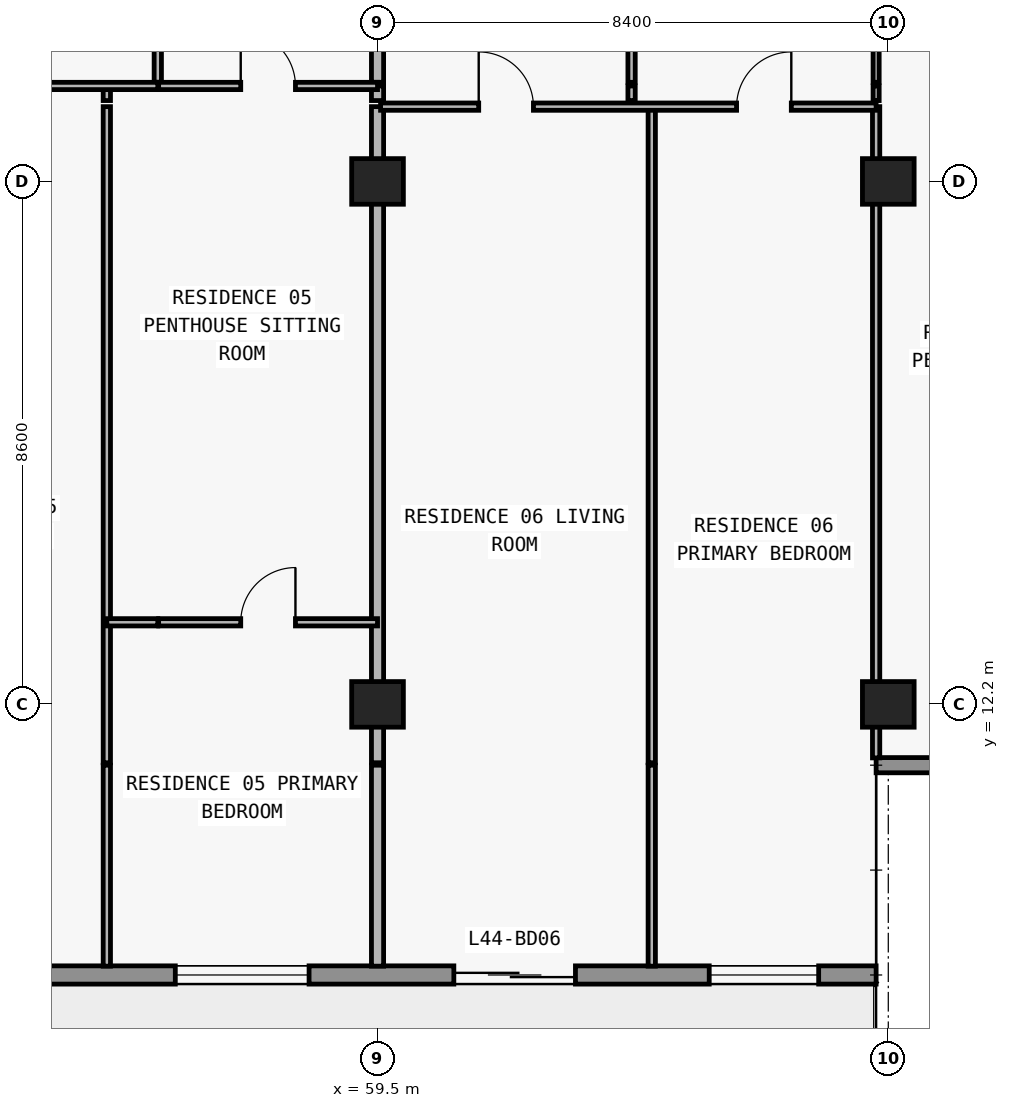
"""IFC4 building model, lengths in metres.
Left out: names, types, materials, properties, quantities, classifications, styles, units other than length and angle.
Written with IfcOpenShell. Run it as: python <this file> out.ifc"""

import sys

from ifc_helpers import new_model, si_unit, direction, frame, frame_2d, origin, origin_2d, place, context, subcontext, project, spatial, rectangle, extrude, element, fill, save


model = new_model("IFC4")
c1 = context("Model", 3, precision=1e-05, world=origin(), true_north=direction((0.0, 1.0)))
c2 = subcontext(c1, "Body", "Model", "MODEL_VIEW")
j1 = project(units=[si_unit("LENGTHUNIT", "METRE"), si_unit("PLANEANGLEUNIT", "RADIAN")], contexts=[c1])
p1 = place(None, origin())
s1 = spatial("IfcSite", under=j1, at=p1, CompositionType="ELEMENT")
p2 = place(p1, origin())
s2 = spatial("IfcBuilding", under=s1, at=p2, CompositionType="ELEMENT")
p3 = place(p2, frame((0.0, 0.0, 160.5)))
s3 = spatial("IfcBuildingStorey", under=s2, at=p3, CompositionType="ELEMENT", Elevation=160.5)
for number, where, z_axis, x_axis in (
    (1, (59.5, 12.2, 0.0), (0.0, 0.0, 1.0), (1.0, 0.0, 0.0)),
    (2, (67.9, 12.2, 0.0), (0.0, 0.0, 1.0), (1.0, 0.0, 0.0)),
    (3, (59.5, 20.8, 0.0), (0.0, 0.0, 1.0), (1.0, 0.0, 0.0)),
    (4, (67.9, 20.8, 0.0), (0.0, 0.0, 1.0), (1.0, 0.0, 0.0)),
):
    element("IfcColumn", number, at=place(p3, frame(where, z_axis=z_axis, x_axis=x_axis)), inside=s3, PredefinedType="COLUMN", context=c2, shape_type="SweptSolid", body=[
        extrude(rectangle(XDim=0.85, YDim=0.75, at=origin_2d()), origin(), (0.0, 0.0, 1.0), 3.05),
    ])
p4 = place(p3, frame((67.7, 7.75, 0.0), z_axis=(0.0, 0.0, 1.0), x_axis=(-1.0, 0.0, 0.0)))
e5 = element("IfcWall", 5, at=p4, inside=s3, PredefinedType="STANDARD", context=c2, shape_type="SweptSolid", body=[
    extrude(rectangle(XDim=57.6, YDim=0.3, at=frame_2d((28.8, 0.0))), origin(), (0.0, 0.0, 1.0), 3.05),
])
p5 = place(p4, frame((54.673, 0.0, 0.0)))
e6 = element("IfcOpeningElement", 6, at=p5, cuts=e5, PredefinedType="OPENING", context=c2, shape_type="SweptSolid", body=[
    extrude(rectangle(XDim=2.0, YDim=2.3, at=frame_2d((1.0, 1.15))), frame((0.0, 0.16, 0.0), z_axis=(0.0, -1.0, 0.0), x_axis=(1.0, 0.0, 0.0)), (0.0, 0.0, 1.0), 0.32),
])
p6 = place(p4, frame((50.473, 0.0, 0.85)))
e7 = element("IfcOpeningElement", 7, at=p6, cuts=e5, PredefinedType="OPENING", context=c2, shape_type="SweptSolid", body=[
    extrude(rectangle(XDim=2.2, YDim=1.55, at=frame_2d((1.1, 0.775))), frame((0.0, 0.16, 0.0), z_axis=(0.0, -1.0, 0.0), x_axis=(1.0, 0.0, 0.0)), (0.0, 0.0, 1.0), 0.32),
])
p7 = place(p4, frame((46.09, 0.0, 0.0)))
e8 = element("IfcOpeningElement", 8, at=p7, cuts=e5, PredefinedType="OPENING", context=c2, shape_type="SweptSolid", body=[
    extrude(rectangle(XDim=2.0, YDim=2.3, at=frame_2d((1.0, 1.15))), frame((0.0, 0.16, 0.0), z_axis=(0.0, -1.0, 0.0), x_axis=(1.0, 0.0, 0.0)), (0.0, 0.0, 1.0), 0.32),
])
p8 = place(p4, frame((41.99, 0.0, 0.85)))
e9 = element("IfcOpeningElement", 9, at=p8, cuts=e5, PredefinedType="OPENING", context=c2, shape_type="SweptSolid", body=[
    extrude(rectangle(XDim=1.8, YDim=1.55, at=frame_2d((0.9, 0.775))), frame((0.0, 0.16, 0.0), z_axis=(0.0, -1.0, 0.0), x_axis=(1.0, 0.0, 0.0)), (0.0, 0.0, 1.0), 0.32),
])
p9 = place(p4, frame((38.09, 0.0, 0.0)))
e10 = element("IfcOpeningElement", 10, at=p9, cuts=e5, PredefinedType="OPENING", context=c2, shape_type="SweptSolid", body=[
    extrude(rectangle(XDim=2.0, YDim=2.3, at=frame_2d((1.0, 1.15))), frame((0.0, 0.16, 0.0), z_axis=(0.0, -1.0, 0.0), x_axis=(1.0, 0.0, 0.0)), (0.0, 0.0, 1.0), 0.32),
])
p10 = place(p4, frame((33.41, 0.0, 0.65)))
e11 = element("IfcOpeningElement", 11, at=p10, cuts=e5, PredefinedType="OPENING", context=c2, shape_type="SweptSolid", body=[
    extrude(rectangle(XDim=2.6, YDim=1.85, at=frame_2d((1.3, 0.925))), frame((0.0, 0.16, 0.0), z_axis=(0.0, -1.0, 0.0), x_axis=(1.0, 0.0, 0.0)), (0.0, 0.0, 1.0), 0.32),
])
p11 = place(p4, frame((27.7, 0.0, 0.85)))
e12 = element("IfcOpeningElement", 12, at=p11, cuts=e5, PredefinedType="OPENING", context=c2, shape_type="SweptSolid", body=[
    extrude(rectangle(XDim=2.2, YDim=1.55, at=frame_2d((1.1, 0.775))), frame((0.0, 0.16, 0.0), z_axis=(0.0, -1.0, 0.0), x_axis=(1.0, 0.0, 0.0)), (0.0, 0.0, 1.0), 0.32),
])
p12 = place(p4, frame((21.69, 0.0, 0.0)))
e13 = element("IfcOpeningElement", 13, at=p12, cuts=e5, PredefinedType="OPENING", context=c2, shape_type="SweptSolid", body=[
    extrude(rectangle(XDim=2.0, YDim=2.3, at=frame_2d((1.0, 1.15))), frame((0.0, 0.16, 0.0), z_axis=(0.0, -1.0, 0.0), x_axis=(1.0, 0.0, 0.0)), (0.0, 0.0, 1.0), 0.32),
])
p13 = place(p4, frame((17.59, 0.0, 0.85)))
e14 = element("IfcOpeningElement", 14, at=p13, cuts=e5, PredefinedType="OPENING", context=c2, shape_type="SweptSolid", body=[
    extrude(rectangle(XDim=1.8, YDim=1.55, at=frame_2d((0.9, 0.775))), frame((0.0, 0.16, 0.0), z_axis=(0.0, -1.0, 0.0), x_axis=(1.0, 0.0, 0.0)), (0.0, 0.0, 1.0), 0.32),
])
p14 = place(p4, frame((13.626, 0.0, 0.0)))
e15 = element("IfcOpeningElement", 15, at=p14, cuts=e5, PredefinedType="OPENING", context=c2, shape_type="SweptSolid", body=[
    extrude(rectangle(XDim=2.0, YDim=2.3, at=frame_2d((1.0, 1.15))), frame((0.0, 0.16, 0.0), z_axis=(0.0, -1.0, 0.0), x_axis=(1.0, 0.0, 0.0)), (0.0, 0.0, 1.0), 0.32),
])
p15 = place(p4, frame((9.326, 0.0, 0.85)))
e16 = element("IfcOpeningElement", 16, at=p15, cuts=e5, PredefinedType="OPENING", context=c2, shape_type="SweptSolid", body=[
    extrude(rectangle(XDim=2.2, YDim=1.55, at=frame_2d((1.1, 0.775))), frame((0.0, 0.16, 0.0), z_axis=(0.0, -1.0, 0.0), x_axis=(1.0, 0.0, 0.0)), (0.0, 0.0, 1.0), 0.32),
])
p16 = place(p4, frame((4.945, 0.0, 0.0)))
e17 = element("IfcOpeningElement", 17, at=p16, cuts=e5, PredefinedType="OPENING", context=c2, shape_type="SweptSolid", body=[
    extrude(rectangle(XDim=2.0, YDim=2.3, at=frame_2d((1.0, 1.15))), frame((0.0, 0.16, 0.0), z_axis=(0.0, -1.0, 0.0), x_axis=(1.0, 0.0, 0.0)), (0.0, 0.0, 1.0), 0.32),
])
p17 = place(p4, frame((0.945, 0.0, 0.85)))
e18 = element("IfcOpeningElement", 18, at=p17, cuts=e5, PredefinedType="OPENING", context=c2, shape_type="SweptSolid", body=[
    extrude(rectangle(XDim=1.8, YDim=1.55, at=frame_2d((0.9, 0.775))), frame((0.0, 0.16, 0.0), z_axis=(0.0, -1.0, 0.0), x_axis=(1.0, 0.0, 0.0)), (0.0, 0.0, 1.0), 0.32),
])
p18 = place(p3, frame((67.7, 11.2, 0.0), z_axis=(0.0, 0.0, 1.0), x_axis=(1.0, 0.0, 0.0)))
e19 = element("IfcWall", 19, at=p18, inside=s3, PredefinedType="ELEMENTEDWALL", context=c2, shape_type="SweptSolid", body=[
    extrude(rectangle(XDim=3.85, YDim=0.25, at=frame_2d((1.925, 0.0))), origin(), (0.0, 0.0, 1.0), 3.05),
])
p19 = place(p3, frame((55.048, 7.895, 0.0), z_axis=(0.0, 0.0, 1.0), x_axis=(0.0, 1.0, 0.0)))
e20 = element("IfcWall", 20, at=p19, inside=s3, PredefinedType="PARTITIONING", context=c2, shape_type="SweptSolid", body=[
    extrude(rectangle(XDim=3.305, YDim=0.12, at=frame_2d((1.652, 0.0))), origin(), (0.0, 0.0, 1.0), 3.05),
])
p20 = place(p3, frame((55.048, 11.24, 0.0), z_axis=(0.0, 0.0, 1.0), x_axis=(0.0, 1.0, 0.0)))
e21 = element("IfcWall", 21, at=p20, inside=s3, PredefinedType="PARTITIONING", context=c2, shape_type="SweptSolid", body=[
    extrude(rectangle(XDim=10.79, YDim=0.12, at=frame_2d((5.395, 0.0))), origin(), (0.0, 0.0, 1.0), 3.05),
])
p21 = place(p3, frame((55.048, 22.13, 0.0), z_axis=(0.0, 0.0, 1.0), x_axis=(0.0, 1.0, 0.0)))
e22 = element("IfcWall", 22, at=p21, inside=s3, PredefinedType="PARTITIONING", context=c2, shape_type="SweptSolid", body=[
    extrude(rectangle(XDim=0.24, YDim=0.12, at=frame_2d((0.12, 0.0))), origin(), (0.0, 0.0, 1.0), 3.05),
])
p22 = place(p3, frame((55.886, 22.43, 0.0), z_axis=(0.0, 0.0, 1.0), x_axis=(0.0, 1.0, 0.0)))
e23 = element("IfcWall", 23, at=p22, inside=s3, PredefinedType="PARTITIONING", context=c2, shape_type="SweptSolid", body=[
    extrude(rectangle(XDim=4.75, YDim=0.12, at=frame_2d((2.375, 0.0))), origin(), (0.0, 0.0, 1.0), 3.05),
])
p23 = place(p22, frame((1.925, 0.0, 0.0)))
e24 = element("IfcOpeningElement", 24, at=p23, cuts=e23, PredefinedType="OPENING", context=c2, shape_type="SweptSolid", body=[
    extrude(rectangle(XDim=0.9, YDim=2.15, at=frame_2d((0.45, 1.075))), frame((0.0, 0.07, 0.0), z_axis=(0.0, -1.0, 0.0), x_axis=(1.0, 0.0, 0.0)), (0.0, 0.0, 1.0), 0.14),
])
p24 = place(p3, frame((59.5, 7.895, 0.0), z_axis=(0.0, 0.0, 1.0), x_axis=(0.0, 1.0, 0.0)))
e25 = element("IfcWall", 25, at=p24, inside=s3, PredefinedType="PARTITIONING", context=c2, shape_type="SweptSolid", body=[
    extrude(rectangle(XDim=3.305, YDim=0.2, at=frame_2d((1.652, 0.0))), origin(), (0.0, 0.0, 1.0), 3.05),
])
p25 = place(p3, frame((59.5, 11.24, 0.0), z_axis=(0.0, 0.0, 1.0), x_axis=(0.0, 1.0, 0.0)))
e26 = element("IfcWall", 26, at=p25, inside=s3, PredefinedType="PARTITIONING", context=c2, shape_type="SweptSolid", body=[
    extrude(rectangle(XDim=10.79, YDim=0.2, at=frame_2d((5.395, 0.0))), origin(), (0.0, 0.0, 1.0), 2.263),
])
p26 = place(p3, frame((59.5, 22.13, 0.0), z_axis=(0.0, 0.0, 1.0), x_axis=(0.0, 1.0, 0.0)))
e27 = element("IfcWall", 27, at=p26, inside=s3, PredefinedType="PARTITIONING", context=c2, shape_type="SweptSolid", body=[
    extrude(rectangle(XDim=0.24, YDim=0.2, at=frame_2d((0.12, 0.0))), origin(), (0.0, 0.0, 1.0), 2.263),
])
p27 = place(p3, frame((59.5, 22.43, 0.0), z_axis=(0.0, 0.0, 1.0), x_axis=(0.0, 1.0, 0.0)))
e28 = element("IfcWall", 28, at=p27, inside=s3, PredefinedType="PARTITIONING", context=c2, shape_type="SweptSolid", body=[
    extrude(rectangle(XDim=4.75, YDim=0.2, at=frame_2d((2.375, 0.0))), origin(), (0.0, 0.0, 1.0), 2.263),
])
p28 = place(p3, frame((63.678, 22.13, 0.0), z_axis=(0.0, 0.0, 1.0), x_axis=(0.0, 1.0, 0.0)))
e29 = element("IfcWall", 29, at=p28, inside=s3, PredefinedType="PARTITIONING", context=c2, shape_type="SweptSolid", body=[
    extrude(rectangle(XDim=0.24, YDim=0.12, at=frame_2d((0.12, 0.0))), origin(), (0.0, 0.0, 1.0), 3.05),
])
p29 = place(p3, frame((63.678, 22.43, 0.0), z_axis=(0.0, 0.0, 1.0), x_axis=(0.0, 1.0, 0.0)))
e30 = element("IfcWall", 30, at=p29, inside=s3, PredefinedType="PARTITIONING", context=c2, shape_type="SweptSolid", body=[
    extrude(rectangle(XDim=4.75, YDim=0.12, at=frame_2d((2.375, 0.0))), origin(), (0.0, 0.0, 1.0), 3.05),
])
p30 = place(p29, frame((1.925, 0.0, 0.0)))
e31 = element("IfcOpeningElement", 31, at=p30, cuts=e30, PredefinedType="OPENING", context=c2, shape_type="SweptSolid", body=[
    extrude(rectangle(XDim=0.9, YDim=2.15, at=frame_2d((0.45, 1.075))), frame((0.0, 0.07, 0.0), z_axis=(0.0, -1.0, 0.0), x_axis=(1.0, 0.0, 0.0)), (0.0, 0.0, 1.0), 0.14),
])
p31 = place(p3, frame((64.01, 7.895, 0.0), z_axis=(0.0, 0.0, 1.0), x_axis=(0.0, 1.0, 0.0)))
e32 = element("IfcWall", 32, at=p31, inside=s3, PredefinedType="PARTITIONING", context=c2, shape_type="SweptSolid", body=[
    extrude(rectangle(XDim=3.305, YDim=0.12, at=frame_2d((1.652, 0.0))), origin(), (0.0, 0.0, 1.0), 3.05),
])
p32 = place(p3, frame((64.01, 11.24, 0.0), z_axis=(0.0, 0.0, 1.0), x_axis=(0.0, 1.0, 0.0)))
e33 = element("IfcWall", 33, at=p32, inside=s3, PredefinedType="PARTITIONING", context=c2, shape_type="SweptSolid", body=[
    extrude(rectangle(XDim=10.79, YDim=0.12, at=frame_2d((5.395, 0.0))), origin(), (0.0, 0.0, 1.0), 3.05),
])
p33 = place(p3, frame((67.7, 11.32, 0.0), z_axis=(0.0, 0.0, 1.0), x_axis=(0.0, 1.0, 0.0)))
e34 = element("IfcWall", 34, at=p33, inside=s3, PredefinedType="PARTITIONING", context=c2, shape_type="SweptSolid", body=[
    extrude(rectangle(XDim=10.71, YDim=0.12, at=frame_2d((5.355, 0.0))), origin(), (0.0, 0.0, 1.0), 2.263),
])
p34 = place(p3, frame((67.7, 22.13, 0.0), z_axis=(0.0, 0.0, 1.0), x_axis=(0.0, 1.0, 0.0)))
e35 = element("IfcWall", 35, at=p34, inside=s3, PredefinedType="MOVABLE", context=c2, shape_type="SweptSolid", body=[
    extrude(rectangle(XDim=0.24, YDim=0.1, at=frame_2d((0.12, 0.0))), origin(), (0.0, 0.0, 1.0), 2.263),
])
p35 = place(p3, frame((67.7, 22.43, 0.0), z_axis=(0.0, 0.0, 1.0), x_axis=(0.0, 1.0, 0.0)))
e36 = element("IfcWall", 36, at=p35, inside=s3, PredefinedType="MOVABLE", context=c2, shape_type="SweptSolid", body=[
    extrude(rectangle(XDim=4.75, YDim=0.1, at=frame_2d((2.375, 0.0))), origin(), (0.0, 0.0, 1.0), 2.263),
])
p36 = place(p35, frame((1.925, 0.0, 0.0)))
e37 = element("IfcOpeningElement", 37, at=p36, cuts=e36, PredefinedType="OPENING", context=c2, shape_type="SweptSolid", body=[
    extrude(rectangle(XDim=0.9, YDim=2.15, at=frame_2d((0.45, 1.075))), frame((0.0, 0.06, 0.0), z_axis=(0.0, -1.0, 0.0), x_axis=(1.0, 0.0, 0.0)), (0.0, 0.0, 1.0), 0.12),
])
p37 = place(p3, frame((55.048, 13.55, 0.0), z_axis=(0.0, 0.0, 1.0), x_axis=(1.0, 0.0, 0.0)))
e38 = element("IfcWall", 38, at=p37, inside=s3, PredefinedType="PARTITIONING", context=c2, shape_type="SweptSolid", body=[
    extrude(rectangle(XDim=0.838, YDim=0.12, at=frame_2d((0.419, 0.0))), origin(), (0.0, 0.0, 1.0), 3.05),
])
p38 = place(p3, frame((55.9, 13.55, 0.0), z_axis=(0.0, 0.0, 1.0), x_axis=(1.0, 0.0, 0.0)))
e39 = element("IfcWall", 39, at=p38, inside=s3, PredefinedType="PARTITIONING", context=c2, shape_type="SweptSolid", body=[
    extrude(rectangle(XDim=3.6, YDim=0.12, at=frame_2d((1.8, 0.0))), origin(), (0.0, 0.0, 1.0), 3.05),
])
p39 = place(p38, frame((1.35, 0.0, 0.0)))
e40 = element("IfcOpeningElement", 40, at=p39, cuts=e39, PredefinedType="OPENING", context=c2, shape_type="SweptSolid", body=[
    extrude(rectangle(XDim=0.9, YDim=2.15, at=frame_2d((0.45, 1.075))), frame((0.0, 0.07, 0.0), z_axis=(0.0, -1.0, 0.0), x_axis=(1.0, 0.0, 0.0)), (0.0, 0.0, 1.0), 0.14),
])
p40 = place(p3, frame((59.55, 22.03, 0.0), z_axis=(0.0, 0.0, 1.0), x_axis=(1.0, 0.0, 0.0)))
e41 = element("IfcWall", 41, at=p40, inside=s3, PredefinedType="PARTITIONING", context=c2, shape_type="SweptSolid", body=[
    extrude(rectangle(XDim=8.15, YDim=0.12, at=frame_2d((4.075, 0.0))), origin(), (0.0, 0.0, 1.0), 3.05),
])
p41 = place(p40, frame((1.614, 0.0, 0.0)))
e42 = element("IfcOpeningElement", 42, at=p41, cuts=e41, PredefinedType="OPENING", context=c2, shape_type="SweptSolid", body=[
    extrude(rectangle(XDim=0.9, YDim=2.15, at=frame_2d((0.45, 1.075))), frame((0.0, 0.07, 0.0), z_axis=(0.0, -1.0, 0.0), x_axis=(1.0, 0.0, 0.0)), (0.0, 0.0, 1.0), 0.14),
])
p42 = place(p40, frame((5.855, 0.0, 0.0)))
e43 = element("IfcOpeningElement", 43, at=p42, cuts=e41, PredefinedType="OPENING", context=c2, shape_type="SweptSolid", body=[
    extrude(rectangle(XDim=0.9, YDim=2.15, at=frame_2d((0.45, 1.075))), frame((0.0, 0.07, 0.0), z_axis=(0.0, -1.0, 0.0), x_axis=(1.0, 0.0, 0.0)), (0.0, 0.0, 1.0), 0.14),
])
p43 = place(p3, frame((51.32, 22.37, 0.0), z_axis=(0.0, 0.0, 1.0), x_axis=(1.0, 0.0, 0.0)))
e44 = element("IfcWall", 44, at=p43, inside=s3, PredefinedType="PARTITIONING", context=c2, shape_type="SweptSolid", body=[
    extrude(rectangle(XDim=4.566, YDim=0.12, at=frame_2d((2.283, 0.0))), origin(), (0.0, 0.0, 1.0), 3.05),
])
p44 = place(p43, frame((1.414, 0.0, 0.0)))
e45 = element("IfcOpeningElement", 45, at=p44, cuts=e44, PredefinedType="OPENING", context=c2, shape_type="SweptSolid", body=[
    extrude(rectangle(XDim=0.9, YDim=2.15, at=frame_2d((0.45, 1.075))), frame((0.0, 0.07, 0.0), z_axis=(0.0, -1.0, 0.0), x_axis=(1.0, 0.0, 0.0)), (0.0, 0.0, 1.0), 0.14),
])
p45 = place(p3, frame((55.9, 22.37, 0.0), z_axis=(0.0, 0.0, 1.0), x_axis=(1.0, 0.0, 0.0)))
e46 = element("IfcWall", 46, at=p45, inside=s3, PredefinedType="PARTITIONING", context=c2, shape_type="SweptSolid", body=[
    extrude(rectangle(XDim=3.6, YDim=0.12, at=frame_2d((1.8, 0.0))), origin(), (0.0, 0.0, 1.0), 3.05),
])
p46 = place(p45, frame((1.35, 0.0, 0.0)))
e47 = element("IfcOpeningElement", 47, at=p46, cuts=e46, PredefinedType="OPENING", context=c2, shape_type="SweptSolid", body=[
    extrude(rectangle(XDim=0.9, YDim=2.15, at=frame_2d((0.45, 1.075))), frame((0.0, 0.07, 0.0), z_axis=(0.0, -1.0, 0.0), x_axis=(1.0, 0.0, 0.0)), (0.0, 0.0, 1.0), 0.14),
])
p47 = place(p15, origin())
e48 = element("IfcWindow", 48, at=p47, inside=s3, PartitioningType="SINGLE_PANEL", PredefinedType="WINDOW", context=c2, shape_type="SweptSolid", body=[
    extrude(rectangle(XDim=2.2, YDim=1.55, at=frame_2d((1.1, 0.775))), frame((0.0, 0.03, 0.0), z_axis=(0.0, -1.0, 0.0), x_axis=(1.0, 0.0, 0.0)), (0.0, 0.0, 1.0), 0.06),
])
fill(e16, e48)
p48 = place(p16, origin())
e49 = element("IfcDoor", 49, at=p48, inside=s3, OperationType="DOUBLE_DOOR_SLIDING", PredefinedType="DOOR", context=c2, shape_type="SweptSolid", body=[
    extrude(rectangle(XDim=2.0, YDim=2.3, at=frame_2d((1.0, 1.15))), frame((0.0, 0.025, 0.0), z_axis=(0.0, -1.0, 0.0), x_axis=(1.0, 0.0, 0.0)), (0.0, 0.0, 1.0), 0.05),
])
fill(e17, e49)
p49 = place(p17, origin())
e50 = element("IfcWindow", 50, at=p49, inside=s3, PartitioningType="SINGLE_PANEL", PredefinedType="WINDOW", context=c2, shape_type="SweptSolid", body=[
    extrude(rectangle(XDim=1.8, YDim=1.55, at=frame_2d((0.9, 0.775))), frame((0.0, 0.03, 0.0), z_axis=(0.0, -1.0, 0.0), x_axis=(1.0, 0.0, 0.0)), (0.0, 0.0, 1.0), 0.06),
])
fill(e18, e50)
p50 = place(p46, origin())
e51 = element("IfcDoor", 51, at=p50, inside=s3, OperationType="SINGLE_SWING_LEFT", PredefinedType="DOOR", context=c2, shape_type="SweptSolid", body=[
    extrude(rectangle(XDim=0.9, YDim=2.15, at=frame_2d((0.45, 1.075))), frame((0.0, 0.025, 0.0), z_axis=(0.0, -1.0, 0.0), x_axis=(1.0, 0.0, 0.0)), (0.0, 0.0, 1.0), 0.05),
])
fill(e47, e51)
p51 = place(p39, origin())
e52 = element("IfcDoor", 52, at=p51, inside=s3, OperationType="SINGLE_SWING_RIGHT", PredefinedType="DOOR", context=c2, shape_type="SweptSolid", body=[
    extrude(rectangle(XDim=0.9, YDim=2.15, at=frame_2d((0.45, 1.075))), frame((0.0, 0.025, 0.0), z_axis=(0.0, -1.0, 0.0), x_axis=(1.0, 0.0, 0.0)), (0.0, 0.0, 1.0), 0.05),
])
fill(e40, e52)
p52 = place(p41, origin())
e53 = element("IfcDoor", 53, at=p52, inside=s3, OperationType="SINGLE_SWING_LEFT", PredefinedType="DOOR", context=c2, shape_type="SweptSolid", body=[
    extrude(rectangle(XDim=0.9, YDim=2.15, at=frame_2d((0.45, 1.075))), frame((0.0, 0.025, 0.0), z_axis=(0.0, -1.0, 0.0), x_axis=(1.0, 0.0, 0.0)), (0.0, 0.0, 1.0), 0.05),
])
fill(e42, e53)
p53 = place(p42, origin())
e54 = element("IfcDoor", 54, at=p53, inside=s3, OperationType="SINGLE_SWING_RIGHT", PredefinedType="DOOR", context=c2, shape_type="SweptSolid", body=[
    extrude(rectangle(XDim=0.9, YDim=2.15, at=frame_2d((0.45, 1.075))), frame((0.0, 0.025, 0.0), z_axis=(0.0, -1.0, 0.0), x_axis=(1.0, 0.0, 0.0)), (0.0, 0.0, 1.0), 0.05),
])
fill(e43, e54)
save(model, sys.argv[1])
